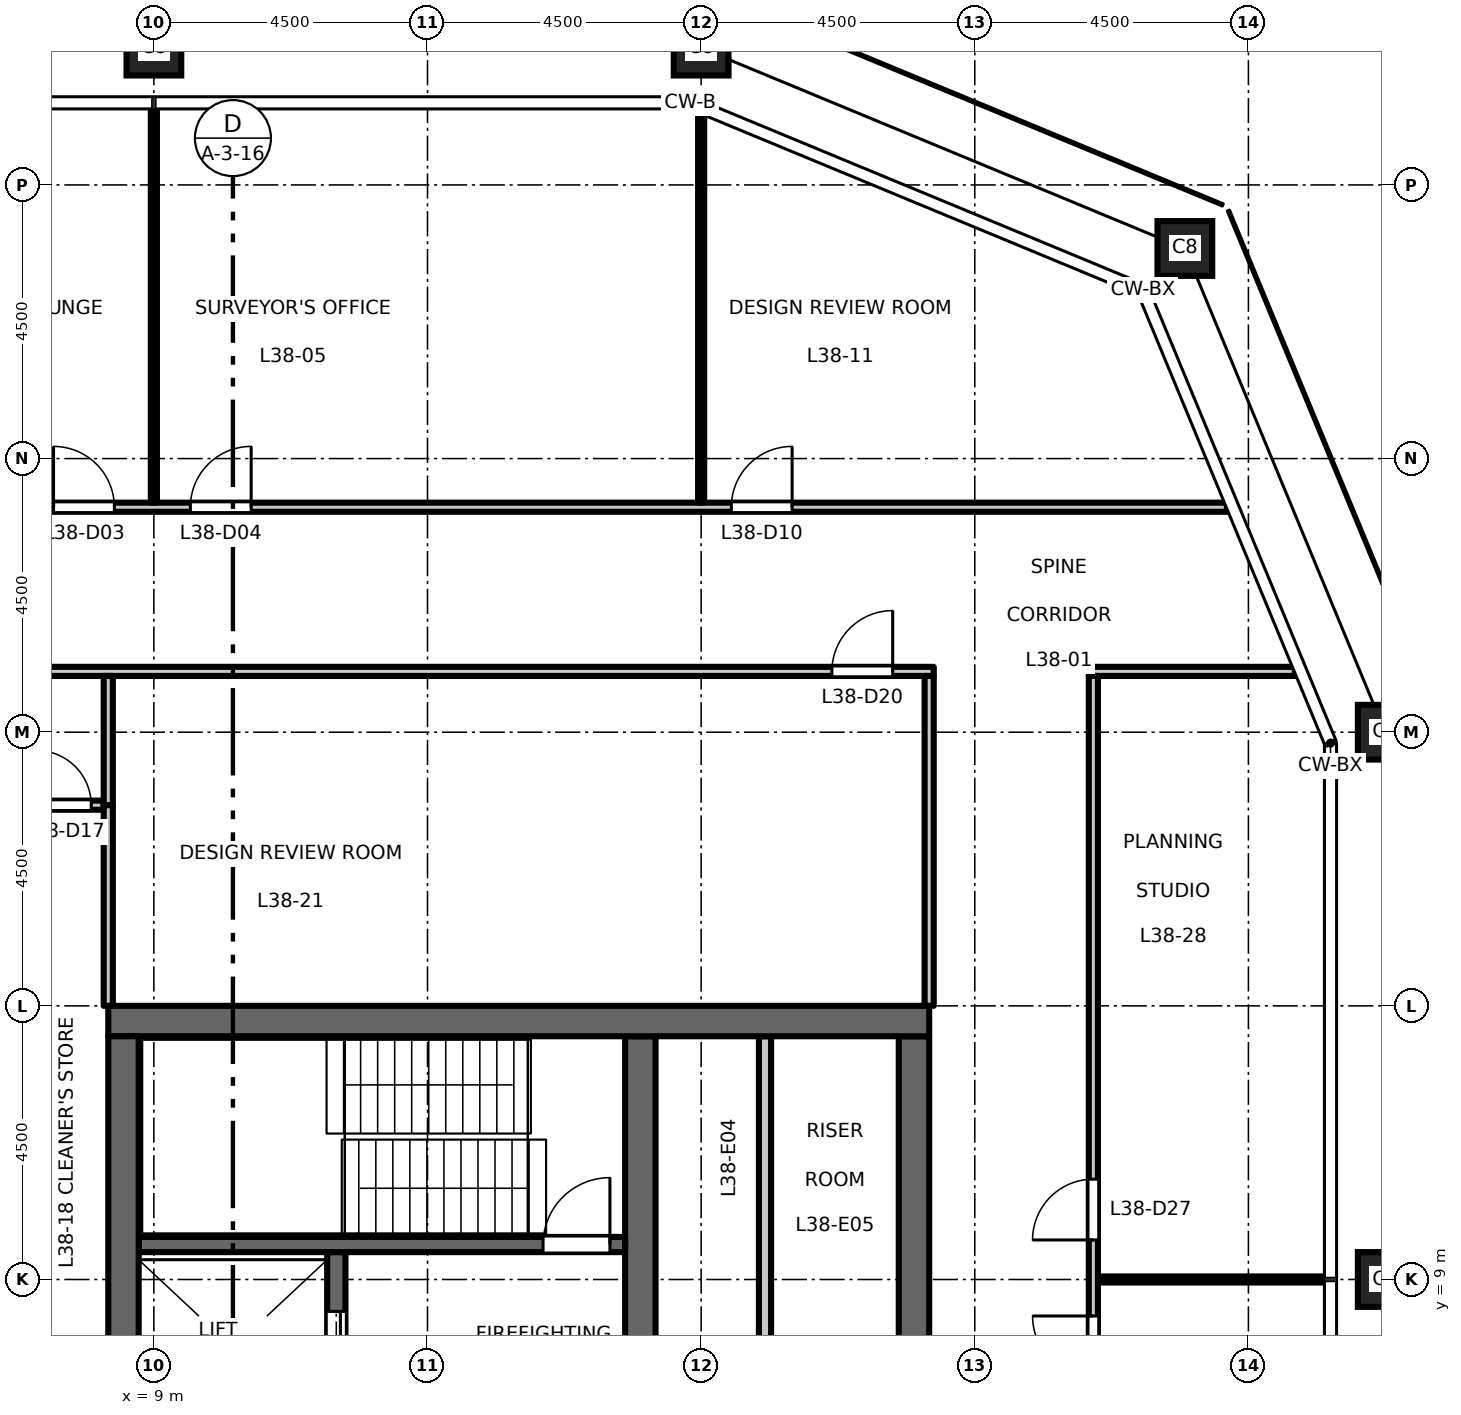
"""IFC4 building model, lengths in metres.
Left out: names, types, materials, properties, quantities, classifications, styles, units other than length and angle.
Written with IfcOpenShell. Run it as: python <this file> out.ifc"""

import sys

from ifc_helpers import new_model, si_unit, direction, frame, frame_2d, origin, origin_2d, place, context, subcontext, project, spatial, rectangle, hollow_rectangle, extrude, element, fill, save


model = new_model("IFC4")
c1 = context("Model", 3, precision=1e-05, world=origin(), true_north=direction((0.0, 1.0)))
c2 = subcontext(c1, "Body", "Model", "MODEL_VIEW")
j1 = project(units=[si_unit("LENGTHUNIT", "METRE"), si_unit("PLANEANGLEUNIT", "RADIAN")], contexts=[c1])
p1 = place(None, origin())
s1 = spatial("IfcSite", under=j1, at=p1, CompositionType="ELEMENT")
p2 = place(p1, origin())
s2 = spatial("IfcBuilding", under=s1, at=p2, CompositionType="ELEMENT")
p3 = place(p2, frame((0.0, 0.0, 176.7)))
s3 = spatial("IfcBuildingStorey", under=s2, at=p3, CompositionType="ELEMENT", Elevation=176.7)
for number, where, z_axis, x_axis in (
    (1, (29.25, 9.0, 0.0), (0.0, 0.0, 1.0), (1.0, 0.0, 0.0)),
    (2, (29.25, 18.0, 0.0), (0.0, 0.0, 1.0), (1.0, 0.0, 0.0)),
    (3, (25.955, 25.955, 0.0), (0.0, 0.0, 1.0), (1.0, 0.0, 0.0)),
    (4, (18.0, 29.25, 0.0), (0.0, 0.0, 1.0), (1.0, 0.0, 0.0)),
    (5, (9.0, 29.25, 0.0), (0.0, 0.0, 1.0), (1.0, 0.0, 0.0)),
):
    element("IfcColumn", number, at=place(p3, frame(where, z_axis=z_axis, x_axis=x_axis)), inside=s3, PredefinedType="COLUMN", context=c2, shape_type="SweptSolid", body=[
        extrude(hollow_rectangle(XDim=0.9, YDim=0.9, WallThickness=0.05, at=origin_2d()), origin(), (0.0, 0.0, 1.0), 4.5),
    ])
p4 = place(p3, frame((12.0, -9.45, 0.0), z_axis=(0.0, 0.0, 1.0), x_axis=(0.0, 1.0, 0.0)))
e6 = element("IfcWall", 6, at=p4, inside=s3, PredefinedType="SHEAR", context=c2, shape_type="SweptSolid", body=[
    extrude(rectangle(XDim=18.9, YDim=0.3, at=frame_2d((9.45, 0.0))), origin(), (0.0, 0.0, 1.0), 4.3),
])
p5 = place(p4, frame((3.625, 0.0, 0.0)))
e7 = element("IfcOpeningElement", 7, at=p5, cuts=e6, PredefinedType="OPENING", context=c2, shape_type="SweptSolid", body=[
    extrude(rectangle(XDim=1.1, YDim=2.1, at=frame_2d((0.55, 1.05))), frame((0.0, 0.16, 0.0), z_axis=(0.0, -1.0, 0.0), x_axis=(1.0, 0.0, 0.0)), (0.0, 0.0, 1.0), 0.32),
])
p6 = place(p4, frame((6.775, 0.0, 0.0)))
e8 = element("IfcOpeningElement", 8, at=p6, cuts=e6, PredefinedType="OPENING", context=c2, shape_type="SweptSolid", body=[
    extrude(rectangle(XDim=1.1, YDim=2.1, at=frame_2d((0.55, 1.05))), frame((0.0, 0.16, 0.0), z_axis=(0.0, -1.0, 0.0), x_axis=(1.0, 0.0, 0.0)), (0.0, 0.0, 1.0), 0.32),
])
p7 = place(p4, frame((9.925, 0.0, 0.0)))
e9 = element("IfcOpeningElement", 9, at=p7, cuts=e6, PredefinedType="OPENING", context=c2, shape_type="SweptSolid", body=[
    extrude(rectangle(XDim=1.1, YDim=2.1, at=frame_2d((0.55, 1.05))), frame((0.0, 0.16, 0.0), z_axis=(0.0, -1.0, 0.0), x_axis=(1.0, 0.0, 0.0)), (0.0, 0.0, 1.0), 0.32),
])
p8 = place(p4, frame((13.075, 0.0, 0.0)))
e10 = element("IfcOpeningElement", 10, at=p8, cuts=e6, PredefinedType="OPENING", context=c2, shape_type="SweptSolid", body=[
    extrude(rectangle(XDim=1.1, YDim=2.1, at=frame_2d((0.55, 1.05))), frame((0.0, 0.16, 0.0), z_axis=(0.0, -1.0, 0.0), x_axis=(1.0, 0.0, 0.0)), (0.0, 0.0, 1.0), 0.32),
])
p9 = place(p4, frame((16.725, 0.0, 0.0)))
e11 = element("IfcOpeningElement", 11, at=p9, cuts=e6, PredefinedType="OPENING", context=c2, shape_type="SweptSolid", body=[
    extrude(rectangle(XDim=1.2, YDim=2.1, at=frame_2d((0.6, 1.05))), frame((0.0, 0.16, 0.0), z_axis=(0.0, -1.0, 0.0), x_axis=(1.0, 0.0, 0.0)), (0.0, 0.0, 1.0), 0.32),
])
p10 = place(p4, frame((0.975, 0.0, 0.0)))
e12 = element("IfcOpeningElement", 12, at=p10, cuts=e6, PredefinedType="OPENING", context=c2, shape_type="SweptSolid", body=[
    extrude(rectangle(XDim=1.2, YDim=2.1, at=frame_2d((0.6, 1.05))), frame((0.0, 0.16, 0.0), z_axis=(0.0, -1.0, 0.0), x_axis=(1.0, 0.0, 0.0)), (0.0, 0.0, 1.0), 0.32),
])
p11 = place(p3, frame((21.5, -13.0, 0.0), z_axis=(0.0, 0.0, 1.0), x_axis=(0.0, 1.0, 0.0)))
e13 = element("IfcWall", 13, at=p11, inside=s3, PredefinedType="SHEAR", context=c2, shape_type="SweptSolid", body=[
    extrude(rectangle(XDim=26.0, YDim=0.5, at=frame_2d((13.0, 0.0))), origin(), (0.0, 0.0, 1.0), 4.3),
])
p12 = place(p11, frame((16.825, 0.0, 0.0)))
e14 = element("IfcOpeningElement", 14, at=p12, cuts=e13, PredefinedType="OPENING", context=c2, shape_type="SweptSolid", body=[
    extrude(rectangle(XDim=1.8, YDim=2.1, at=frame_2d((0.9, 1.05))), frame((0.0, 0.26, 0.0), z_axis=(0.0, -1.0, 0.0), x_axis=(1.0, 0.0, 0.0)), (0.0, 0.0, 1.0), 0.52),
])
p13 = place(p11, frame((7.375, 0.0, 0.0)))
e15 = element("IfcOpeningElement", 15, at=p13, cuts=e13, PredefinedType="OPENING", context=c2, shape_type="SweptSolid", body=[
    extrude(rectangle(XDim=1.8, YDim=2.1, at=frame_2d((0.9, 1.05))), frame((0.0, 0.26, 0.0), z_axis=(0.0, -1.0, 0.0), x_axis=(1.0, 0.0, 0.0)), (0.0, 0.0, 1.0), 0.52),
])
p14 = place(p3, frame((19.05, 6.425, 0.0), z_axis=(0.0, 0.0, 1.0), x_axis=(0.0, 1.0, 0.0)))
e16 = element("IfcWall", 16, at=p14, inside=s3, PredefinedType="PARTITIONING", context=c2, shape_type="SweptSolid", body=[
    extrude(rectangle(XDim=6.575, YDim=0.2, at=frame_2d((3.288, 0.0))), origin(), (0.0, 0.0, 1.0), 4.3),
])
p15 = place(p3, frame((17.0, 6.425, 0.0), z_axis=(0.0, 0.0, 1.0), x_axis=(0.0, 1.0, 0.0)))
e17 = element("IfcWall", 17, at=p15, inside=s3, PredefinedType="SHEAR", context=c2, shape_type="SweptSolid", body=[
    extrude(rectangle(XDim=6.575, YDim=0.5, at=frame_2d((3.288, 0.0))), origin(), (0.0, 0.0, 1.0), 4.3),
])
p16 = place(p3, frame((8.75, 9.575, 0.0), z_axis=(0.0, 0.0, 1.0), x_axis=(1.0, 0.0, 0.0)))
e18 = element("IfcWall", 18, at=p16, inside=s3, PredefinedType="SHEAR", context=c2, shape_type="SweptSolid", body=[
    extrude(rectangle(XDim=8.0, YDim=0.25, at=frame_2d((4.0, 0.0))), origin(), (0.0, 0.0, 1.0), 4.3),
])
p17 = place(p16, frame((6.65, 0.0, 0.0)))
e19 = element("IfcOpeningElement", 19, at=p17, cuts=e18, PredefinedType="OPENING", context=c2, shape_type="SweptSolid", body=[
    extrude(rectangle(XDim=1.1, YDim=2.1, at=frame_2d((0.55, 1.05))), frame((0.0, 0.135, 0.0), z_axis=(0.0, -1.0, 0.0), x_axis=(1.0, 0.0, 0.0)), (0.0, 0.0, 1.0), 0.27),
])
p18 = place(p3, frame((8.25, 13.25, 0.0), z_axis=(0.0, 0.0, 1.0), x_axis=(1.0, 0.0, 0.0)))
e20 = element("IfcWall", 20, at=p18, inside=s3, PredefinedType="SHEAR", context=c2, shape_type="SweptSolid", body=[
    extrude(rectangle(XDim=13.5, YDim=0.5, at=frame_2d((6.75, 0.0))), origin(), (0.0, 0.0, 1.0), 4.3),
])
p19 = place(p3, frame((8.5, -13.0, 0.0), z_axis=(0.0, 0.0, 1.0), x_axis=(0.0, 1.0, 0.0)))
e21 = element("IfcWall", 21, at=p19, inside=s3, PredefinedType="SHEAR", context=c2, shape_type="SweptSolid", body=[
    extrude(rectangle(XDim=26.0, YDim=0.5, at=frame_2d((13.0, 0.0))), origin(), (0.0, 0.0, 1.0), 4.3),
])
p20 = place(p3, frame((24.525, 9.0, 0.0), z_axis=(0.0, 0.0, 1.0), x_axis=(1.0, 0.0, 0.0)))
e22 = element("IfcWall", 22, at=p20, inside=s3, PredefinedType="PARTITIONING", context=c2, shape_type="SweptSolid", body=[
    extrude(rectangle(XDim=3.735, YDim=0.1, at=frame_2d((1.868, 0.0))), origin(), (0.0, 0.0, 1.0), 4.3),
])
p21 = place(p3, frame((6.92, 16.8, 0.0), z_axis=(0.0, 0.0, 1.0), x_axis=(1.0, 0.0, 0.0)))
e23 = element("IfcWall", 23, at=p21, inside=s3, PredefinedType="PARTITIONING", context=c2, shape_type="SweptSolid", body=[
    extrude(rectangle(XDim=1.255, YDim=0.15, at=frame_2d((0.627, 0.0))), origin(), (0.0, 0.0, 1.0), 4.3),
])
p22 = place(p21, frame((0.15, 0.0, 0.0)))
e24 = element("IfcOpeningElement", 24, at=p22, cuts=e23, PredefinedType="OPENING", context=c2, shape_type="SweptSolid", body=[
    extrude(rectangle(XDim=0.9, YDim=2.1, at=frame_2d((0.45, 1.05))), frame((0.0, 0.085, 0.0), z_axis=(0.0, -1.0, 0.0), x_axis=(1.0, 0.0, 0.0)), (0.0, 0.0, 1.0), 0.17),
])
p23 = place(p3, frame((-21.825, 19.0, 0.0), z_axis=(0.0, 0.0, 1.0), x_axis=(1.0, 0.0, 0.0)))
e25 = element("IfcWall", 25, at=p23, inside=s3, PredefinedType="PARTITIONING", context=c2, shape_type="SweptSolid", body=[
    extrude(rectangle(XDim=43.65, YDim=0.15, at=frame_2d((21.825, 0.0))), origin(), (0.0, 0.0, 1.0), 4.3),
])
p24 = place(p23, frame((14.225, 0.0, 0.0)))
e26 = element("IfcOpeningElement", 26, at=p24, cuts=e25, PredefinedType="OPENING", context=c2, shape_type="SweptSolid", body=[
    extrude(rectangle(XDim=1.0, YDim=2.1, at=frame_2d((0.5, 1.05))), frame((0.0, 0.085, 0.0), z_axis=(0.0, -1.0, 0.0), x_axis=(1.0, 0.0, 0.0)), (0.0, 0.0, 1.0), 0.17),
])
p25 = place(p23, frame((0.725, 0.0, 0.0)))
e27 = element("IfcOpeningElement", 27, at=p25, cuts=e25, PredefinedType="OPENING", context=c2, shape_type="SweptSolid", body=[
    extrude(rectangle(XDim=1.0, YDim=2.1, at=frame_2d((0.5, 1.05))), frame((0.0, 0.085, 0.0), z_axis=(0.0, -1.0, 0.0), x_axis=(1.0, 0.0, 0.0)), (0.0, 0.0, 1.0), 0.17),
])
p26 = place(p23, frame((41.975, 0.0, 0.0)))
e28 = element("IfcOpeningElement", 28, at=p26, cuts=e25, PredefinedType="OPENING", context=c2, shape_type="SweptSolid", body=[
    extrude(rectangle(XDim=1.0, YDim=2.1, at=frame_2d((0.5, 1.05))), frame((0.0, 0.085, 0.0), z_axis=(0.0, -1.0, 0.0), x_axis=(1.0, 0.0, 0.0)), (0.0, 0.0, 1.0), 0.17),
])
p27 = place(p3, frame((24.375, 19.0, 0.0), z_axis=(0.0, 0.0, 1.0), x_axis=(1.0, 0.0, 0.0)))
e29 = element("IfcWall", 29, at=p27, inside=s3, PredefinedType="PARTITIONING", context=c2, shape_type="SweptSolid", body=[
    extrude(rectangle(XDim=3.389, YDim=0.15, at=frame_2d((1.694, 0.0))), origin(), (0.0, 0.0, 1.0), 4.3),
])
p28 = place(p3, frame((-26.646, 21.7, 0.0), z_axis=(0.0, 0.0, 1.0), x_axis=(1.0, 0.0, 0.0)))
e30 = element("IfcWall", 30, at=p28, inside=s3, PredefinedType="PARTITIONING", context=c2, shape_type="SweptSolid", body=[
    extrude(rectangle(XDim=53.292, YDim=0.15, at=frame_2d((26.646, 0.0))), origin(), (0.0, 0.0, 1.0), 4.3),
])
p29 = place(p28, frame((15.996, 0.0, 0.0)))
e31 = element("IfcOpeningElement", 31, at=p29, cuts=e30, PredefinedType="OPENING", context=c2, shape_type="SweptSolid", body=[
    extrude(rectangle(XDim=1.0, YDim=2.1, at=frame_2d((0.5, 1.05))), frame((0.0, 0.085, 0.0), z_axis=(0.0, -1.0, 0.0), x_axis=(1.0, 0.0, 0.0)), (0.0, 0.0, 1.0), 0.17),
])
p30 = place(p28, frame((18.246, 0.0, 0.0)))
e32 = element("IfcOpeningElement", 32, at=p30, cuts=e30, PredefinedType="OPENING", context=c2, shape_type="SweptSolid", body=[
    extrude(rectangle(XDim=1.0, YDim=2.1, at=frame_2d((0.5, 1.05))), frame((0.0, 0.085, 0.0), z_axis=(0.0, -1.0, 0.0), x_axis=(1.0, 0.0, 0.0)), (0.0, 0.0, 1.0), 0.17),
])
p31 = place(p28, frame((33.996, 0.0, 0.0)))
e33 = element("IfcOpeningElement", 33, at=p31, cuts=e30, PredefinedType="OPENING", context=c2, shape_type="SweptSolid", body=[
    extrude(rectangle(XDim=1.0, YDim=2.1, at=frame_2d((0.5, 1.05))), frame((0.0, 0.085, 0.0), z_axis=(0.0, -1.0, 0.0), x_axis=(1.0, 0.0, 0.0)), (0.0, 0.0, 1.0), 0.17),
])
p32 = place(p28, frame((36.246, 0.0, 0.0)))
e34 = element("IfcOpeningElement", 34, at=p32, cuts=e30, PredefinedType="OPENING", context=c2, shape_type="SweptSolid", body=[
    extrude(rectangle(XDim=1.0, YDim=2.1, at=frame_2d((0.5, 1.05))), frame((0.0, 0.085, 0.0), z_axis=(0.0, -1.0, 0.0), x_axis=(1.0, 0.0, 0.0)), (0.0, 0.0, 1.0), 0.17),
])
p33 = place(p28, frame((6.996, 0.0, 0.0)))
e35 = element("IfcOpeningElement", 35, at=p33, cuts=e30, PredefinedType="OPENING", context=c2, shape_type="SweptSolid", body=[
    extrude(rectangle(XDim=1.0, YDim=2.1, at=frame_2d((0.5, 1.05))), frame((0.0, 0.085, 0.0), z_axis=(0.0, -1.0, 0.0), x_axis=(1.0, 0.0, 0.0)), (0.0, 0.0, 1.0), 0.17),
])
p34 = place(p28, frame((45.142, 0.0, 0.0)))
e36 = element("IfcOpeningElement", 36, at=p34, cuts=e30, PredefinedType="OPENING", context=c2, shape_type="SweptSolid", body=[
    extrude(rectangle(XDim=1.0, YDim=2.1, at=frame_2d((0.5, 1.05))), frame((0.0, 0.085, 0.0), z_axis=(0.0, -1.0, 0.0), x_axis=(1.0, 0.0, 0.0)), (0.0, 0.0, 1.0), 0.17),
])
p35 = place(p3, frame((8.25, 16.8, 0.0), z_axis=(0.0, 0.0, 1.0), x_axis=(0.0, 1.0, 0.0)))
e37 = element("IfcWall", 37, at=p35, inside=s3, PredefinedType="PARTITIONING", context=c2, shape_type="SweptSolid", body=[
    extrude(rectangle(XDim=2.125, YDim=0.15, at=frame_2d((1.062, 0.0))), origin(), (0.0, 0.0, 1.0), 4.3),
])
p36 = place(p3, frame((8.25, 13.5, 0.0), z_axis=(0.0, 0.0, 1.0), x_axis=(0.0, 1.0, 0.0)))
e38 = element("IfcWall", 38, at=p36, inside=s3, PredefinedType="PARTITIONING", context=c2, shape_type="SweptSolid", body=[
    extrude(rectangle(XDim=3.3, YDim=0.15, at=frame_2d((1.65, 0.0))), origin(), (0.0, 0.0, 1.0), 4.3),
])
p37 = place(p3, frame((9.0, 21.775, 0.0), z_axis=(0.0, 0.0, 1.0), x_axis=(0.0, 1.0, 0.0)))
e39 = element("IfcWall", 39, at=p37, inside=s3, PredefinedType="PARTITIONING", context=c2, shape_type="SweptSolid", body=[
    extrude(rectangle(XDim=6.485, YDim=0.1, at=frame_2d((3.243, 0.0))), origin(), (0.0, 0.0, 1.0), 3.4),
])
p38 = place(p3, frame((18.0, 21.775, 0.0), z_axis=(0.0, 0.0, 1.0), x_axis=(0.0, 1.0, 0.0)))
e40 = element("IfcWall", 40, at=p38, inside=s3, PredefinedType="PARTITIONING", context=c2, shape_type="SweptSolid", body=[
    extrude(rectangle(XDim=6.403, YDim=0.1, at=frame_2d((3.202, 0.0))), origin(), (0.0, 0.0, 1.0), 3.4),
])
p39 = place(p3, frame((21.75, 13.5, 0.0), z_axis=(0.0, 0.0, 1.0), x_axis=(0.0, 1.0, 0.0)))
e41 = element("IfcWall", 41, at=p39, inside=s3, PredefinedType="PARTITIONING", context=c2, shape_type="SweptSolid", body=[
    extrude(rectangle(XDim=5.425, YDim=0.15, at=frame_2d((2.712, 0.0))), origin(), (0.0, 0.0, 1.0), 4.3),
])
p40 = place(p3, frame((24.45, -18.925, 0.0), z_axis=(0.0, 0.0, 1.0), x_axis=(0.0, 1.0, 0.0)))
e42 = element("IfcWall", 42, at=p40, inside=s3, PredefinedType="PARTITIONING", context=c2, shape_type="SweptSolid", body=[
    extrude(rectangle(XDim=37.85, YDim=0.15, at=frame_2d((18.925, 0.0))), origin(), (0.0, 0.0, 1.0), 4.3),
])
p41 = place(p40, frame((8.325, 0.0, 0.0)))
e43 = element("IfcOpeningElement", 43, at=p41, cuts=e42, PredefinedType="OPENING", context=c2, shape_type="SweptSolid", body=[
    extrude(rectangle(XDim=1.0, YDim=2.1, at=frame_2d((0.5, 1.05))), frame((0.0, 0.085, 0.0), z_axis=(0.0, -1.0, 0.0), x_axis=(1.0, 0.0, 0.0)), (0.0, 0.0, 1.0), 0.17),
])
p42 = place(p40, frame((10.575, 0.0, 0.0)))
e44 = element("IfcOpeningElement", 44, at=p42, cuts=e42, PredefinedType="OPENING", context=c2, shape_type="SweptSolid", body=[
    extrude(rectangle(XDim=1.0, YDim=2.1, at=frame_2d((0.5, 1.05))), frame((0.0, 0.085, 0.0), z_axis=(0.0, -1.0, 0.0), x_axis=(1.0, 0.0, 0.0)), (0.0, 0.0, 1.0), 0.17),
])
p43 = place(p40, frame((26.325, 0.0, 0.0)))
e45 = element("IfcOpeningElement", 45, at=p43, cuts=e42, PredefinedType="OPENING", context=c2, shape_type="SweptSolid", body=[
    extrude(rectangle(XDim=1.0, YDim=2.1, at=frame_2d((0.5, 1.05))), frame((0.0, 0.085, 0.0), z_axis=(0.0, -1.0, 0.0), x_axis=(1.0, 0.0, 0.0)), (0.0, 0.0, 1.0), 0.17),
])
p44 = place(p40, frame((28.575, 0.0, 0.0)))
e46 = element("IfcOpeningElement", 46, at=p44, cuts=e42, PredefinedType="OPENING", context=c2, shape_type="SweptSolid", body=[
    extrude(rectangle(XDim=1.0, YDim=2.1, at=frame_2d((0.5, 1.05))), frame((0.0, 0.085, 0.0), z_axis=(0.0, -1.0, 0.0), x_axis=(1.0, 0.0, 0.0)), (0.0, 0.0, 1.0), 0.17),
])
p45 = place(p17, origin())
e47 = element("IfcDoor", 47, at=p45, inside=s3, OperationType="SINGLE_SWING_LEFT", PredefinedType="DOOR", context=c2, shape_type="SweptSolid", body=[
    extrude(rectangle(XDim=1.1, YDim=2.1, at=frame_2d((0.55, 1.05))), frame((0.0, 0.025, 0.0), z_axis=(0.0, -1.0, 0.0), x_axis=(1.0, 0.0, 0.0)), (0.0, 0.0, 1.0), 0.05),
])
fill(e19, e47)
p46 = place(p9, origin())
e48 = element("IfcDoor", 48, at=p46, inside=s3, OperationType="DOUBLE_DOOR_SLIDING", PredefinedType="DOOR", context=c2, shape_type="SweptSolid", body=[
    extrude(rectangle(XDim=1.2, YDim=2.1, at=frame_2d((0.6, 1.05))), frame((0.0, 0.025, 0.0), z_axis=(0.0, -1.0, 0.0), x_axis=(1.0, 0.0, 0.0)), (0.0, 0.0, 1.0), 0.05),
])
fill(e11, e48)
p47 = place(p31, origin())
e49 = element("IfcDoor", 49, at=p47, inside=s3, OperationType="SINGLE_SWING_LEFT", PredefinedType="DOOR", context=c2, shape_type="SweptSolid", body=[
    extrude(rectangle(XDim=1.0, YDim=2.1, at=frame_2d((0.5, 1.05))), frame((0.0, 0.025, 0.0), z_axis=(0.0, -1.0, 0.0), x_axis=(1.0, 0.0, 0.0)), (0.0, 0.0, 1.0), 0.05),
])
fill(e33, e49)
p48 = place(p32, origin())
e50 = element("IfcDoor", 50, at=p48, inside=s3, OperationType="SINGLE_SWING_RIGHT", PredefinedType="DOOR", context=c2, shape_type="SweptSolid", body=[
    extrude(rectangle(XDim=1.0, YDim=2.1, at=frame_2d((0.5, 1.05))), frame((0.0, 0.025, 0.0), z_axis=(0.0, -1.0, 0.0), x_axis=(1.0, 0.0, 0.0)), (0.0, 0.0, 1.0), 0.05),
])
fill(e34, e50)
p49 = place(p34, origin())
e51 = element("IfcDoor", 51, at=p49, inside=s3, OperationType="SINGLE_SWING_RIGHT", PredefinedType="DOOR", context=c2, shape_type="SweptSolid", body=[
    extrude(rectangle(XDim=1.0, YDim=2.1, at=frame_2d((0.5, 1.05))), frame((0.0, 0.025, 0.0), z_axis=(0.0, -1.0, 0.0), x_axis=(1.0, 0.0, 0.0)), (0.0, 0.0, 1.0), 0.05),
])
fill(e36, e51)
p50 = place(p22, origin())
e52 = element("IfcDoor", 52, at=p50, inside=s3, OperationType="SINGLE_SWING_LEFT", PredefinedType="DOOR", context=c2, shape_type="SweptSolid", body=[
    extrude(rectangle(XDim=0.9, YDim=2.1, at=frame_2d((0.45, 1.05))), frame((0.0, 0.025, 0.0), z_axis=(0.0, -1.0, 0.0), x_axis=(1.0, 0.0, 0.0)), (0.0, 0.0, 1.0), 0.05),
])
fill(e24, e52)
p51 = place(p26, origin())
e53 = element("IfcDoor", 53, at=p51, inside=s3, OperationType="SINGLE_SWING_RIGHT", PredefinedType="DOOR", context=c2, shape_type="SweptSolid", body=[
    extrude(rectangle(XDim=1.0, YDim=2.1, at=frame_2d((0.5, 1.05))), frame((0.0, 0.025, 0.0), z_axis=(0.0, -1.0, 0.0), x_axis=(1.0, 0.0, 0.0)), (0.0, 0.0, 1.0), 0.05),
])
fill(e28, e53)
p52 = place(p43, origin())
e54 = element("IfcDoor", 54, at=p52, inside=s3, OperationType="SINGLE_SWING_RIGHT", PredefinedType="DOOR", context=c2, shape_type="SweptSolid", body=[
    extrude(rectangle(XDim=1.0, YDim=2.1, at=frame_2d((0.5, 1.05))), frame((0.0, 0.025, 0.0), z_axis=(0.0, -1.0, 0.0), x_axis=(1.0, 0.0, 0.0)), (0.0, 0.0, 1.0), 0.05),
])
fill(e45, e54)
p53 = place(p44, origin())
e55 = element("IfcDoor", 55, at=p53, inside=s3, OperationType="SINGLE_SWING_LEFT", PredefinedType="DOOR", context=c2, shape_type="SweptSolid", body=[
    extrude(rectangle(XDim=1.0, YDim=2.1, at=frame_2d((0.5, 1.05))), frame((0.0, 0.025, 0.0), z_axis=(0.0, -1.0, 0.0), x_axis=(1.0, 0.0, 0.0)), (0.0, 0.0, 1.0), 0.05),
])
fill(e46, e55)
save(model, sys.argv[1])
